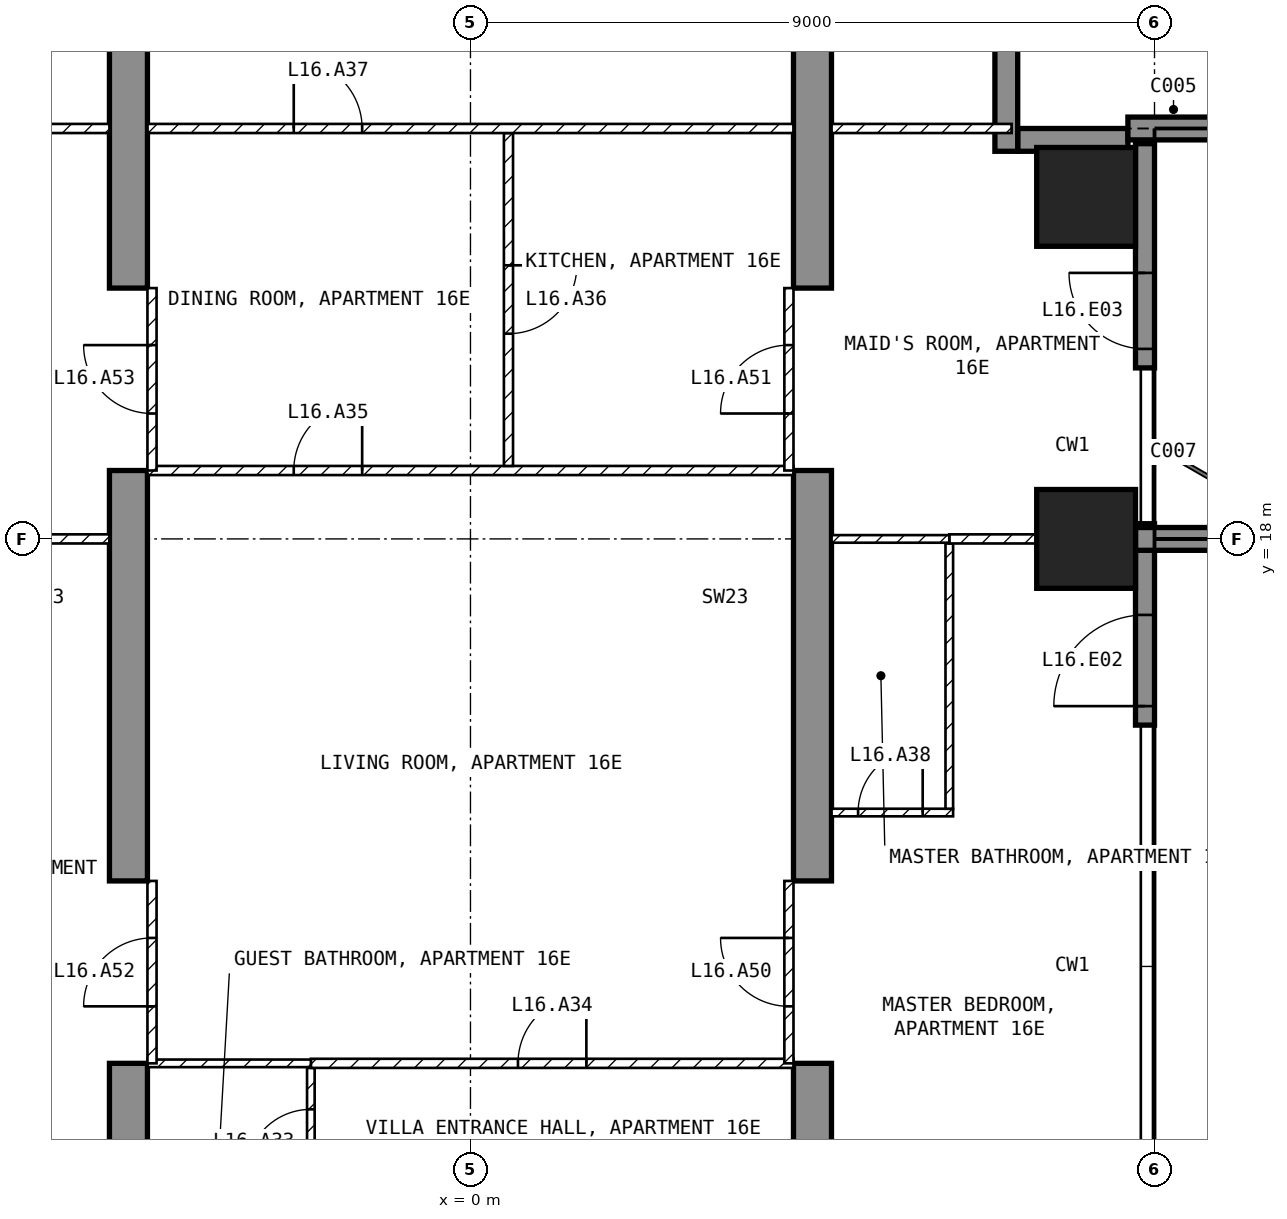
"""IFC4 building model, lengths in metres.
Left out: names, types, materials, properties, quantities, classifications, styles, units other than length and angle.
Written with IfcOpenShell. Run it as: python <this file> out.ifc"""

import sys

from ifc_helpers import new_model, si_unit, direction, frame, frame_2d, origin, origin_2d, place, context, subcontext, project, spatial, polyline, rectangle, outline, extrude, element, fill, save


model = new_model("IFC4")
c1 = context("Model", 3, precision=1e-05, world=origin(), true_north=direction((0.0, 1.0)))
c2 = subcontext(c1, "Body", "Model", "MODEL_VIEW")
j1 = project(units=[si_unit("LENGTHUNIT", "METRE"), si_unit("PLANEANGLEUNIT", "RADIAN")], contexts=[c1])
p1 = place(None, origin())
s1 = spatial("IfcSite", under=j1, at=p1, CompositionType="ELEMENT")
p2 = place(p1, origin())
s2 = spatial("IfcBuilding", under=s1, at=p2, CompositionType="ELEMENT")
p3 = place(p2, frame((0.0, 0.0, 75.0)))
s3 = spatial("IfcBuildingStorey", under=s2, at=p3, CompositionType="ELEMENT", Elevation=75.0)
for number, where, z_axis, x_axis in (
    (1, (8.1, 18.0, -0.25), (0.0, 0.0, 1.0), (1.0, 0.0, 0.0)),
    (2, (8.1, 22.5, -0.25), (0.0, 0.0, 1.0), (1.0, 0.0, 0.0)),
):
    element("IfcColumn", number, at=place(p3, frame(where, z_axis=z_axis, x_axis=x_axis)), inside=s3, PredefinedType="COLUMN", context=c2, shape_type="SweptSolid", body=[
        extrude(rectangle(XDim=1.3, YDim=1.3, at=origin_2d()), origin(), (0.0, 0.0, 1.0), 3.5),
    ])
for number, where, z_axis, x_axis in (
    (3, (-4.75, 9.0, -0.25), (1.0, 0.0, 0.0), (0.0, 1.0, 0.0)),
    (4, (4.25, 9.0, -0.25), (1.0, 0.0, 0.0), (0.0, 1.0, 0.0)),
):
    element("IfcWall", number, at=place(p3, frame(where, z_axis=z_axis, x_axis=x_axis)), inside=s3, PredefinedType="SHEAR", context=c2, shape_type="SweptSolid", body=[
        extrude(outline(polyline([(0.0, 0.0), (2.1, 0.0), (2.1, 2.65), (4.5, 2.65), (4.5, 0.0), (9.9, 0.0), (9.9, 2.65), (12.3, 2.65), (12.3, 0.0), (16.45, 0.0), (16.45, 3.5), (0.0, 3.5), (0.0, 0.0)])), origin(), (0.0, 0.0, 1.0), 0.5),
    ])
p4 = place(p3, frame((8.875, 15.55, 0.0), z_axis=(0.0, 0.0, 1.0), x_axis=(0.0, 1.0, 0.0)))
e5 = element("IfcWall", 5, at=p4, inside=s3, PredefinedType="SOLIDWALL", context=c2, shape_type="SweptSolid", body=[
    extrude(rectangle(XDim=2.65, YDim=0.25, at=frame_2d((1.325, 0.0))), origin(), (0.0, 0.0, 1.0), 3.25),
])
p5 = place(p4, frame((0.25, 0.0, 0.0)))
e6 = element("IfcOpeningElement", 6, at=p5, cuts=e5, PredefinedType="OPENING", context=c2, shape_type="SweptSolid", body=[
    extrude(rectangle(XDim=1.2, YDim=2.4, at=frame_2d((0.6, 1.2))), frame((0.0, 0.135, 0.0), z_axis=(0.0, -1.0, 0.0), x_axis=(1.0, 0.0, 0.0)), (0.0, 0.0, 1.0), 0.27),
])
p6 = place(p3, frame((8.875, 20.25, 0.0), z_axis=(0.0, 0.0, 1.0), x_axis=(0.0, 1.0, 0.0)))
e7 = element("IfcWall", 7, at=p6, inside=s3, PredefinedType="SOLIDWALL", context=c2, shape_type="SweptSolid", body=[
    extrude(rectangle(XDim=2.95, YDim=0.25, at=frame_2d((1.475, 0.0))), origin(), (0.0, 0.0, 1.0), 3.25),
])
p7 = place(p6, frame((0.25, 0.0, 0.0)))
e8 = element("IfcOpeningElement", 8, at=p7, cuts=e7, PredefinedType="OPENING", context=c2, shape_type="SweptSolid", body=[
    extrude(rectangle(XDim=1.0, YDim=2.4, at=frame_2d((0.5, 1.2))), frame((0.0, 0.135, 0.0), z_axis=(0.0, -1.0, 0.0), x_axis=(1.0, 0.0, 0.0)), (0.0, 0.0, 1.0), 0.27),
])
p8 = place(p3, frame((8.65, 23.25, 0.0), z_axis=(0.0, 0.0, 1.0), x_axis=(-1.0, 0.0, 0.0)))
e9 = element("IfcWall", 9, at=p8, inside=s3, PredefinedType="SOLIDWALL", context=c2, shape_type="SweptSolid", body=[
    extrude(rectangle(XDim=1.45, YDim=0.3, at=frame_2d((0.725, 0.0))), origin(), (0.0, 0.0, 1.0), 3.25),
])
p9 = place(p3, frame((7.05, 23.1, 0.0), z_axis=(0.0, 0.0, 1.0), x_axis=(0.0, 1.0, 0.0)))
e10 = element("IfcWall", 10, at=p9, inside=s3, PredefinedType="SOLIDWALL", context=c2, shape_type="SweptSolid", body=[
    extrude(rectangle(XDim=1.8, YDim=0.3, at=frame_2d((0.9, 0.0))), origin(), (0.0, 0.0, 1.0), 3.25),
])
p10 = place(p3, frame((8.75, 18.0, 0.0), z_axis=(0.0, 0.0, 1.0), x_axis=(1.0, 0.0, 0.0)))
e11 = element("IfcWall", 11, at=p10, inside=s3, PredefinedType="SOLIDWALL", context=c2, shape_type="SweptSolid", body=[
    extrude(rectangle(XDim=2.95, YDim=0.3, at=frame_2d((1.475, 0.0))), origin(), (0.0, 0.0, 1.0), 3.25),
])
p11 = place(p3, frame((8.65, 23.4, 0.0), z_axis=(0.0, 0.0, 1.0), x_axis=(1.0, 0.0, 0.0)))
e12 = element("IfcWall", 12, at=p11, inside=s3, PredefinedType="SOLIDWALL", context=c2, shape_type="SweptSolid", body=[
    extrude(rectangle(XDim=3.05, YDim=0.3, at=frame_2d((1.525, 0.0))), origin(), (0.0, 0.0, 1.0), 3.25),
])
p12 = place(p3, frame((-2.1, 9.1, 0.0), z_axis=(0.0, 0.0, 1.0), x_axis=(0.0, 1.0, 0.0)))
e13 = element("IfcWall", 13, at=p12, inside=s3, PredefinedType="PARTITIONING", context=c2, shape_type="SweptSolid", body=[
    extrude(rectangle(XDim=1.94, YDim=0.1, at=frame_2d((0.97, 0.0))), origin(), (0.0, 0.0, 1.0), 3.25),
])
p13 = place(p12, frame((0.545, 0.0, 0.0)))
e14 = element("IfcOpeningElement", 14, at=p13, cuts=e13, PredefinedType="OPENING", context=c2, shape_type="SweptSolid", body=[
    extrude(rectangle(XDim=0.85, YDim=2.1, at=frame_2d((0.425, 1.05))), frame((0.0, 0.06, 0.0), z_axis=(0.0, -1.0, 0.0), x_axis=(1.0, 0.0, 0.0)), (0.0, 0.0, 1.0), 0.12),
])
p14 = place(p3, frame((-2.1, 11.1, 0.0), z_axis=(0.0, 0.0, 1.0), x_axis=(1.0, 0.0, 0.0)))
e15 = element("IfcWall", 15, at=p14, inside=s3, PredefinedType="PARTITIONING", context=c2, shape_type="SweptSolid", body=[
    extrude(rectangle(XDim=6.35, YDim=0.12, at=frame_2d((3.175, 0.0))), origin(), (0.0, 0.0, 1.0), 3.25),
])
p15 = place(p14, frame((2.725, 0.0, 0.0)))
e16 = element("IfcOpeningElement", 16, at=p15, cuts=e15, PredefinedType="OPENING", context=c2, shape_type="SweptSolid", body=[
    extrude(rectangle(XDim=0.9, YDim=2.1, at=frame_2d((0.45, 1.05))), frame((0.0, 0.07, 0.0), z_axis=(0.0, -1.0, 0.0), x_axis=(1.0, 0.0, 0.0)), (0.0, 0.0, 1.0), 0.14),
])
p16 = place(p3, frame((-4.25, 11.1, 0.0), z_axis=(0.0, 0.0, 1.0), x_axis=(1.0, 0.0, 0.0)))
e17 = element("IfcWall", 17, at=p16, inside=s3, PredefinedType="PARTITIONING", context=c2, shape_type="SweptSolid", body=[
    extrude(rectangle(XDim=2.15, YDim=0.1, at=frame_2d((1.075, 0.0))), origin(), (0.0, 0.0, 1.0), 3.25),
])
p17 = place(p3, frame((-4.25, 18.9, 0.0), z_axis=(0.0, 0.0, 1.0), x_axis=(1.0, 0.0, 0.0)))
e18 = element("IfcWall", 18, at=p17, inside=s3, PredefinedType="PARTITIONING", context=c2, shape_type="SweptSolid", body=[
    extrude(rectangle(XDim=8.5, YDim=0.12, at=frame_2d((4.25, 0.0))), origin(), (0.0, 0.0, 1.0), 3.25),
])
p18 = place(p17, frame((1.925, 0.0, 0.0)))
e19 = element("IfcOpeningElement", 19, at=p18, cuts=e18, PredefinedType="OPENING", context=c2, shape_type="SweptSolid", body=[
    extrude(rectangle(XDim=0.9, YDim=2.1, at=frame_2d((0.45, 1.05))), frame((0.0, 0.07, 0.0), z_axis=(0.0, -1.0, 0.0), x_axis=(1.0, 0.0, 0.0)), (0.0, 0.0, 1.0), 0.14),
])
p19 = place(p3, frame((0.5, 23.34, 0.0), z_axis=(0.0, 0.0, 1.0), x_axis=(0.0, -1.0, 0.0)))
e20 = element("IfcWall", 20, at=p19, inside=s3, PredefinedType="PARTITIONING", context=c2, shape_type="SweptSolid", body=[
    extrude(rectangle(XDim=4.38, YDim=0.12, at=frame_2d((2.19, 0.0))), origin(), (0.0, 0.0, 1.0), 3.25),
])
p20 = place(p19, frame((1.74, 0.0, 0.0)))
e21 = element("IfcOpeningElement", 21, at=p20, cuts=e20, PredefinedType="OPENING", context=c2, shape_type="SweptSolid", body=[
    extrude(rectangle(XDim=0.9, YDim=2.1, at=frame_2d((0.45, 1.05))), frame((0.0, 0.07, 0.0), z_axis=(0.0, -1.0, 0.0), x_axis=(1.0, 0.0, 0.0)), (0.0, 0.0, 1.0), 0.14),
])
p21 = place(p3, frame((-4.25, 23.4, 0.0), z_axis=(0.0, 0.0, 1.0), x_axis=(1.0, 0.0, 0.0)))
e22 = element("IfcWall", 22, at=p21, inside=s3, PredefinedType="PARTITIONING", context=c2, shape_type="SweptSolid", body=[
    extrude(rectangle(XDim=8.5, YDim=0.12, at=frame_2d((4.25, 0.0))), origin(), (0.0, 0.0, 1.0), 3.25),
])
p22 = place(p21, frame((1.925, 0.0, 0.0)))
e23 = element("IfcOpeningElement", 23, at=p22, cuts=e22, PredefinedType="OPENING", context=c2, shape_type="SweptSolid", body=[
    extrude(rectangle(XDim=0.9, YDim=2.1, at=frame_2d((0.45, 1.05))), frame((0.0, 0.07, 0.0), z_axis=(0.0, -1.0, 0.0), x_axis=(1.0, 0.0, 0.0)), (0.0, 0.0, 1.0), 0.14),
])
p23 = place(p3, frame((4.75, 14.4, 0.0), z_axis=(0.0, 0.0, 1.0), x_axis=(1.0, 0.0, 0.0)))
e24 = element("IfcWall", 24, at=p23, inside=s3, PredefinedType="PARTITIONING", context=c2, shape_type="SweptSolid", body=[
    extrude(rectangle(XDim=1.6, YDim=0.1, at=frame_2d((0.8, 0.0))), origin(), (0.0, 0.0, 1.0), 3.25),
])
p24 = place(p23, frame((0.35, 0.0, 0.0)))
e25 = element("IfcOpeningElement", 25, at=p24, cuts=e24, PredefinedType="OPENING", context=c2, shape_type="SweptSolid", body=[
    extrude(rectangle(XDim=0.85, YDim=2.1, at=frame_2d((0.425, 1.05))), frame((0.0, 0.06, 0.0), z_axis=(0.0, -1.0, 0.0), x_axis=(1.0, 0.0, 0.0)), (0.0, 0.0, 1.0), 0.12),
])
p25 = place(p3, frame((6.3, 14.45, 0.0), z_axis=(0.0, 0.0, 1.0), x_axis=(0.0, 1.0, 0.0)))
e26 = element("IfcWall", 26, at=p25, inside=s3, PredefinedType="PARTITIONING", context=c2, shape_type="SweptSolid", body=[
    extrude(rectangle(XDim=3.49, YDim=0.1, at=frame_2d((1.745, 0.0))), origin(), (0.0, 0.0, 1.0), 3.25),
])
p26 = place(p3, frame((6.3, 18.0, 0.0), z_axis=(0.0, 0.0, 1.0), x_axis=(1.0, 0.0, 0.0)))
e27 = element("IfcWall", 27, at=p26, inside=s3, PredefinedType="PARTITIONING", context=c2, shape_type="SweptSolid", body=[
    extrude(rectangle(XDim=1.15, YDim=0.12, at=frame_2d((0.575, 0.0))), origin(), (0.0, 0.0, 1.0), 2.346),
])
p27 = place(p3, frame((4.75, 18.0, 0.0), z_axis=(0.0, 0.0, 1.0), x_axis=(1.0, 0.0, 0.0)))
e28 = element("IfcWall", 28, at=p27, inside=s3, PredefinedType="PARTITIONING", context=c2, shape_type="SweptSolid", body=[
    extrude(rectangle(XDim=1.55, YDim=0.1, at=frame_2d((0.775, 0.0))), origin(), (0.0, 0.0, 1.0), 2.346),
])
p28 = place(p3, frame((4.75, 23.4, 0.0), z_axis=(0.0, 0.0, 1.0), x_axis=(1.0, 0.0, 0.0)))
e29 = element("IfcWall", 29, at=p28, inside=s3, PredefinedType="PARTITIONING", context=c2, shape_type="SweptSolid", body=[
    extrude(rectangle(XDim=2.37, YDim=0.12, at=frame_2d((1.185, 0.0))), origin(), (0.0, 0.0, 1.0), 3.25),
])
p29 = place(p3, frame((-7.45, 18.0, 0.0), z_axis=(0.0, 0.0, 1.0), x_axis=(1.0, 0.0, 0.0)))
e30 = element("IfcWall", 30, at=p29, inside=s3, PredefinedType="PARTITIONING", context=c2, shape_type="SweptSolid", body=[
    extrude(rectangle(XDim=2.7, YDim=0.12, at=frame_2d((1.35, 0.0))), origin(), (0.0, 0.0, 1.0), 2.346),
])
p30 = place(p3, frame((-7.12, 23.4, 0.0), z_axis=(0.0, 0.0, 1.0), x_axis=(1.0, 0.0, 0.0)))
e31 = element("IfcWall", 31, at=p30, inside=s3, PredefinedType="PARTITIONING", context=c2, shape_type="SweptSolid", body=[
    extrude(rectangle(XDim=2.37, YDim=0.12, at=frame_2d((1.185, 0.0))), origin(), (0.0, 0.0, 1.0), 3.25),
])
p31 = place(p3, frame((4.19, 11.1, 0.0), z_axis=(0.0, 0.0, 1.0), x_axis=(0.0, 1.0, 0.0)))
e32 = element("IfcWall", 32, at=p31, inside=s3, PredefinedType="PARTITIONING", context=c2, shape_type="SweptSolid", body=[
    extrude(rectangle(XDim=2.4, YDim=0.12, at=frame_2d((1.2, 0.0))), origin(), (0.0, 0.0, 1.0), 2.4),
])
p32 = place(p31, frame((0.75, 0.0, 0.0)))
e33 = element("IfcOpeningElement", 33, at=p32, cuts=e32, PredefinedType="OPENING", context=c2, shape_type="SweptSolid", body=[
    extrude(rectangle(XDim=0.9, YDim=2.1, at=frame_2d((0.45, 1.05))), frame((0.0, 0.07, 0.0), z_axis=(0.0, -1.0, 0.0), x_axis=(1.0, 0.0, 0.0)), (0.0, 0.0, 1.0), 0.14),
])
p33 = place(p3, frame((4.19, 18.9, 0.0), z_axis=(0.0, 0.0, 1.0), x_axis=(0.0, 1.0, 0.0)))
e34 = element("IfcWall", 34, at=p33, inside=s3, PredefinedType="PARTITIONING", context=c2, shape_type="SweptSolid", body=[
    extrude(rectangle(XDim=2.4, YDim=0.12, at=frame_2d((1.2, 0.0))), origin(), (0.0, 0.0, 1.0), 2.4),
])
p34 = place(p33, frame((0.75, 0.0, 0.0)))
e35 = element("IfcOpeningElement", 35, at=p34, cuts=e34, PredefinedType="OPENING", context=c2, shape_type="SweptSolid", body=[
    extrude(rectangle(XDim=0.9, YDim=2.1, at=frame_2d((0.45, 1.05))), frame((0.0, 0.07, 0.0), z_axis=(0.0, -1.0, 0.0), x_axis=(1.0, 0.0, 0.0)), (0.0, 0.0, 1.0), 0.14),
])
p35 = place(p3, frame((-4.19, 11.1, 0.0), z_axis=(0.0, 0.0, 1.0), x_axis=(0.0, 1.0, 0.0)))
e36 = element("IfcWall", 36, at=p35, inside=s3, PredefinedType="PARTITIONING", context=c2, shape_type="SweptSolid", body=[
    extrude(rectangle(XDim=2.4, YDim=0.12, at=frame_2d((1.2, 0.0))), origin(), (0.0, 0.0, 1.0), 2.4),
])
p36 = place(p35, frame((0.75, 0.0, 0.0)))
e37 = element("IfcOpeningElement", 37, at=p36, cuts=e36, PredefinedType="OPENING", context=c2, shape_type="SweptSolid", body=[
    extrude(rectangle(XDim=0.9, YDim=2.1, at=frame_2d((0.45, 1.05))), frame((0.0, 0.07, 0.0), z_axis=(0.0, -1.0, 0.0), x_axis=(1.0, 0.0, 0.0)), (0.0, 0.0, 1.0), 0.14),
])
p37 = place(p3, frame((-4.19, 18.9, 0.0), z_axis=(0.0, 0.0, 1.0), x_axis=(0.0, 1.0, 0.0)))
e38 = element("IfcWall", 38, at=p37, inside=s3, PredefinedType="PARTITIONING", context=c2, shape_type="SweptSolid", body=[
    extrude(rectangle(XDim=2.4, YDim=0.12, at=frame_2d((1.2, 0.0))), origin(), (0.0, 0.0, 1.0), 2.4),
])
p38 = place(p37, frame((0.75, 0.0, 0.0)))
e39 = element("IfcOpeningElement", 39, at=p38, cuts=e38, PredefinedType="OPENING", context=c2, shape_type="SweptSolid", body=[
    extrude(rectangle(XDim=0.9, YDim=2.1, at=frame_2d((0.45, 1.05))), frame((0.0, 0.07, 0.0), z_axis=(0.0, -1.0, 0.0), x_axis=(1.0, 0.0, 0.0)), (0.0, 0.0, 1.0), 0.14),
])
p39 = place(p5, origin())
e40 = element("IfcDoor", 40, at=p39, inside=s3, OperationType="SINGLE_SWING_LEFT", PredefinedType="DOOR", context=c2, shape_type="SweptSolid", body=[
    extrude(rectangle(XDim=1.2, YDim=2.4, at=frame_2d((0.6, 1.2))), frame((0.0, 0.025, 0.0), z_axis=(0.0, -1.0, 0.0), x_axis=(1.0, 0.0, 0.0)), (0.0, 0.0, 1.0), 0.05),
])
fill(e6, e40)
p40 = place(p7, origin())
e41 = element("IfcDoor", 41, at=p40, inside=s3, OperationType="SINGLE_SWING_RIGHT", PredefinedType="DOOR", context=c2, shape_type="SweptSolid", body=[
    extrude(rectangle(XDim=1.0, YDim=2.4, at=frame_2d((0.5, 1.2))), frame((0.0, 0.025, 0.0), z_axis=(0.0, -1.0, 0.0), x_axis=(1.0, 0.0, 0.0)), (0.0, 0.0, 1.0), 0.05),
])
fill(e8, e41)
p41 = place(p13, origin())
e42 = element("IfcDoor", 42, at=p41, inside=s3, OperationType="SINGLE_SWING_LEFT", PredefinedType="DOOR", context=c2, shape_type="SweptSolid", body=[
    extrude(rectangle(XDim=0.85, YDim=2.1, at=frame_2d((0.425, 1.05))), frame((0.0, 0.025, 0.0), z_axis=(0.0, -1.0, 0.0), x_axis=(1.0, 0.0, 0.0)), (0.0, 0.0, 1.0), 0.05),
])
fill(e14, e42)
p42 = place(p15, origin())
e43 = element("IfcDoor", 43, at=p42, inside=s3, OperationType="SINGLE_SWING_RIGHT", PredefinedType="DOOR", context=c2, shape_type="SweptSolid", body=[
    extrude(rectangle(XDim=0.9, YDim=2.1, at=frame_2d((0.45, 1.05))), frame((0.0, 0.025, 0.0), z_axis=(0.0, -1.0, 0.0), x_axis=(1.0, 0.0, 0.0)), (0.0, 0.0, 1.0), 0.05),
])
fill(e16, e43)
p43 = place(p18, origin())
e44 = element("IfcDoor", 44, at=p43, inside=s3, OperationType="SINGLE_SWING_RIGHT", PredefinedType="DOOR", context=c2, shape_type="SweptSolid", body=[
    extrude(rectangle(XDim=0.9, YDim=2.1, at=frame_2d((0.45, 1.05))), frame((0.0, 0.025, 0.0), z_axis=(0.0, -1.0, 0.0), x_axis=(1.0, 0.0, 0.0)), (0.0, 0.0, 1.0), 0.05),
])
fill(e19, e44)
p44 = place(p20, origin())
e45 = element("IfcDoor", 45, at=p44, inside=s3, OperationType="SINGLE_SWING_LEFT", PredefinedType="DOOR", context=c2, shape_type="SweptSolid", body=[
    extrude(rectangle(XDim=0.9, YDim=2.1, at=frame_2d((0.45, 1.05))), frame((0.0, 0.025, 0.0), z_axis=(0.0, -1.0, 0.0), x_axis=(1.0, 0.0, 0.0)), (0.0, 0.0, 1.0), 0.05),
])
fill(e21, e45)
p45 = place(p22, origin())
e46 = element("IfcDoor", 46, at=p45, inside=s3, OperationType="SINGLE_SWING_LEFT", PredefinedType="DOOR", context=c2, shape_type="SweptSolid", body=[
    extrude(rectangle(XDim=0.9, YDim=2.1, at=frame_2d((0.45, 1.05))), frame((0.0, 0.025, 0.0), z_axis=(0.0, -1.0, 0.0), x_axis=(1.0, 0.0, 0.0)), (0.0, 0.0, 1.0), 0.05),
])
fill(e23, e46)
p46 = place(p24, origin())
e47 = element("IfcDoor", 47, at=p46, inside=s3, OperationType="SINGLE_SWING_RIGHT", PredefinedType="DOOR", context=c2, shape_type="SweptSolid", body=[
    extrude(rectangle(XDim=0.85, YDim=2.1, at=frame_2d((0.425, 1.05))), frame((0.0, 0.025, 0.0), z_axis=(0.0, -1.0, 0.0), x_axis=(1.0, 0.0, 0.0)), (0.0, 0.0, 1.0), 0.05),
])
fill(e25, e47)
p47 = place(p32, origin())
e48 = element("IfcDoor", 48, at=p47, inside=s3, OperationType="SINGLE_SWING_RIGHT", PredefinedType="DOOR", context=c2, shape_type="SweptSolid", body=[
    extrude(rectangle(XDim=0.9, YDim=2.1, at=frame_2d((0.45, 1.05))), frame((0.0, 0.025, 0.0), z_axis=(0.0, -1.0, 0.0), x_axis=(1.0, 0.0, 0.0)), (0.0, 0.0, 1.0), 0.05),
])
fill(e33, e48)
p48 = place(p34, origin())
e49 = element("IfcDoor", 49, at=p48, inside=s3, OperationType="SINGLE_SWING_LEFT", PredefinedType="DOOR", context=c2, shape_type="SweptSolid", body=[
    extrude(rectangle(XDim=0.9, YDim=2.1, at=frame_2d((0.45, 1.05))), frame((0.0, 0.025, 0.0), z_axis=(0.0, -1.0, 0.0), x_axis=(1.0, 0.0, 0.0)), (0.0, 0.0, 1.0), 0.05),
])
fill(e35, e49)
p49 = place(p36, origin())
e50 = element("IfcDoor", 50, at=p49, inside=s3, OperationType="SINGLE_SWING_LEFT", PredefinedType="DOOR", context=c2, shape_type="SweptSolid", body=[
    extrude(rectangle(XDim=0.9, YDim=2.1, at=frame_2d((0.45, 1.05))), frame((0.0, 0.025, 0.0), z_axis=(0.0, -1.0, 0.0), x_axis=(1.0, 0.0, 0.0)), (0.0, 0.0, 1.0), 0.05),
])
fill(e37, e50)
p50 = place(p38, origin())
e51 = element("IfcDoor", 51, at=p50, inside=s3, OperationType="SINGLE_SWING_RIGHT", PredefinedType="DOOR", context=c2, shape_type="SweptSolid", body=[
    extrude(rectangle(XDim=0.9, YDim=2.1, at=frame_2d((0.45, 1.05))), frame((0.0, 0.025, 0.0), z_axis=(0.0, -1.0, 0.0), x_axis=(1.0, 0.0, 0.0)), (0.0, 0.0, 1.0), 0.05),
])
fill(e39, e51)
save(model, sys.argv[1])
